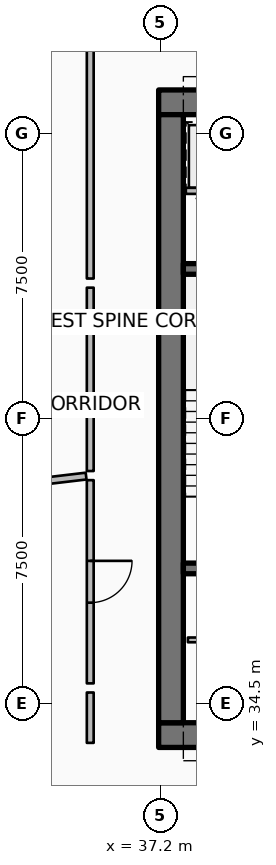
"""IFC4 building model, lengths in metres.
Left out: names, types, materials, properties, quantities, classifications, styles, units other than length and angle.
Written with IfcOpenShell. Run it as: python <this file> out.ifc"""

import sys

from ifc_helpers import new_model, si_unit, direction, frame, frame_2d, origin, place, context, subcontext, project, spatial, rectangle, extrude, element, fill, save


model = new_model("IFC4")
c1 = context("Model", 3, precision=1e-05, world=origin(), true_north=direction((0.0, 1.0)))
c2 = subcontext(c1, "Body", "Model", "MODEL_VIEW")
j1 = project(units=[si_unit("LENGTHUNIT", "METRE"), si_unit("PLANEANGLEUNIT", "RADIAN")], contexts=[c1])
p1 = place(None, origin())
s1 = spatial("IfcSite", under=j1, at=p1, CompositionType="ELEMENT")
p2 = place(p1, origin())
s2 = spatial("IfcBuilding", under=s1, at=p2, CompositionType="ELEMENT")
p3 = place(p2, frame((0.0, 0.0, 180.3)))
s3 = spatial("IfcBuildingStorey", under=s2, at=p3, CompositionType="ELEMENT", Elevation=180.3)
for number, where, z_axis, x_axis in (
    (1, (37.15, 33.675, 0.0), (0.0, 0.0, 1.0), (1.0, 0.0, 0.0)),
    (2, (37.15, 50.325, 0.0), (0.0, 0.0, 1.0), (1.0, 0.0, 0.0)),
):
    element("IfcWall", number, at=place(p3, frame(where, z_axis=z_axis, x_axis=x_axis)), inside=s3, PredefinedType="SHEAR", context=c2, shape_type="SweptSolid", body=[
        extrude(rectangle(XDim=9.75, YDim=0.65, at=frame_2d((4.875, 0.0))), origin(), (0.0, 0.0, 1.0), 3.75),
    ])
p4 = place(p3, frame((37.475, 34.0, 0.0), z_axis=(0.0, 0.0, 1.0), x_axis=(0.0, 1.0, 0.0)))
e3 = element("IfcWall", 3, at=p4, inside=s3, PredefinedType="SHEAR", context=c2, shape_type="SweptSolid", body=[
    extrude(rectangle(XDim=16.0, YDim=0.65, at=frame_2d((8.0, 0.0))), origin(), (0.0, 0.0, 1.0), 3.75),
])
for number, where, z_axis, x_axis in (
    (4, (37.8, 38.06, 0.0), (0.0, 0.0, 1.0), (1.0, 0.0, 0.0)),
    (5, (37.8, 45.94, 0.0), (0.0, 0.0, 1.0), (1.0, 0.0, 0.0)),
):
    element("IfcWall", number, at=place(p3, frame(where, z_axis=z_axis, x_axis=x_axis)), inside=s3, PredefinedType="SHEAR", context=c2, shape_type="SweptSolid", body=[
        extrude(rectangle(XDim=3.5, YDim=0.28, at=frame_2d((1.75, 0.0))), origin(), (0.0, 0.0, 1.0), 3.75),
    ])
p5 = place(p3, frame((39.975, 47.995, 0.0), z_axis=(0.0, 0.0, 1.0), x_axis=(-1.0, 0.0, 0.0)))
e6 = element("IfcWall", 6, at=p5, inside=s3, PredefinedType="PARTITIONING", context=c2, shape_type="SweptSolid", body=[
    extrude(rectangle(XDim=2.11, YDim=0.16, at=frame_2d((1.055, 0.0))), origin(), (0.0, 0.0, 1.0), 3.5),
])
p6 = place(p5, frame((0.505, 0.0, 0.0)))
e7 = element("IfcOpeningElement", 7, at=p6, cuts=e6, PredefinedType="OPENING", context=c2, shape_type="SweptSolid", body=[
    extrude(rectangle(XDim=1.1, YDim=2.1, at=frame_2d((0.55, 1.05))), frame((0.0, 0.09, 0.0), z_axis=(0.0, -1.0, 0.0), x_axis=(1.0, 0.0, 0.0)), (0.0, 0.0, 1.0), 0.18),
])
p7 = place(p3, frame((37.92, 36.18, 0.0), z_axis=(0.0, 0.0, 1.0), x_axis=(1.0, 0.0, 0.0)))
e8 = element("IfcWall", 8, at=p7, inside=s3, PredefinedType="PARTITIONING", context=c2, shape_type="SweptSolid", body=[
    extrude(rectangle(XDim=3.33, YDim=0.125, at=frame_2d((1.665, 0.0))), origin(), (0.0, 0.0, 1.0), 2.94),
])
p8 = place(p7, frame((1.24, 0.0, 0.0)))
e9 = element("IfcOpeningElement", 9, at=p8, cuts=e8, PredefinedType="OPENING", context=c2, shape_type="SweptSolid", body=[
    extrude(rectangle(XDim=0.85, YDim=2.06, at=frame_2d((0.425, 1.03))), frame((0.0, 0.073, 0.0), z_axis=(0.0, -1.0, 0.0), x_axis=(1.0, 0.0, 0.0)), (0.0, 0.0, 1.0), 0.145),
])
p9 = place(p3, frame((35.241, 40.49, 0.0), z_axis=(0.0, 0.0, 1.0), x_axis=(-0.993066731786, -0.117551972417, 0.0)))
e10 = element("IfcWall", 10, at=p9, inside=s3, PredefinedType="PARTITIONING", context=c2, shape_type="SweptSolid", body=[
    extrude(rectangle(XDim=15.047, YDim=0.18, at=frame_2d((7.523, 0.0))), origin(), (0.0, 0.0, 1.0), 2.94),
])
p10 = place(p3, frame((35.35, 51.853, 0.0), z_axis=(0.0, 0.0, 1.0), x_axis=(0.0, -1.0, 0.0)))
e11 = element("IfcWall", 11, at=p10, inside=s3, PredefinedType="PARTITIONING", context=c2, shape_type="SweptSolid", body=[
    extrude(rectangle(XDim=6.165, YDim=0.18, at=frame_2d((3.083, 0.0))), origin(), (0.0, 0.0, 1.0), 2.94),
])
p11 = place(p3, frame((35.35, 45.448, 0.0), z_axis=(0.0, 0.0, 1.0), x_axis=(0.0, -1.0, 0.0)))
e12 = element("IfcWall", 12, at=p11, inside=s3, PredefinedType="PARTITIONING", context=c2, shape_type="SweptSolid", body=[
    extrude(rectangle(XDim=4.825, YDim=0.18, at=frame_2d((2.413, 0.0))), origin(), (0.0, 0.0, 1.0), 2.94),
])
p12 = place(p3, frame((35.35, 40.383, 0.0), z_axis=(0.0, 0.0, 1.0), x_axis=(0.0, -1.0, 0.0)))
e13 = element("IfcWall", 13, at=p12, inside=s3, PredefinedType="PARTITIONING", context=c2, shape_type="SweptSolid", body=[
    extrude(rectangle(XDim=5.347, YDim=0.18, at=frame_2d((2.674, 0.0))), origin(), (0.0, 0.0, 1.0), 2.94),
])
p13 = place(p12, frame((2.124, 0.0, 0.0)))
e14 = element("IfcOpeningElement", 14, at=p13, cuts=e13, PredefinedType="OPENING", context=c2, shape_type="SweptSolid", body=[
    extrude(rectangle(XDim=1.1, YDim=2.1, at=frame_2d((0.55, 1.05))), frame((0.0, 0.1, 0.0), z_axis=(0.0, -1.0, 0.0), x_axis=(1.0, 0.0, 0.0)), (0.0, 0.0, 1.0), 0.2),
])
p14 = place(p3, frame((35.35, 34.796, 0.0), z_axis=(0.0, 0.0, 1.0), x_axis=(0.0, -1.0, 0.0)))
e15 = element("IfcWall", 15, at=p14, inside=s3, PredefinedType="PARTITIONING", context=c2, shape_type="SweptSolid", body=[
    extrude(rectangle(XDim=1.326, YDim=0.18, at=frame_2d((0.663, 0.0))), origin(), (0.0, 0.0, 1.0), 2.94),
])
p15 = place(p13, origin())
e16 = element("IfcDoor", 16, at=p15, inside=s3, OperationType="SINGLE_SWING_LEFT", PredefinedType="DOOR", context=c2, shape_type="SweptSolid", body=[
    extrude(rectangle(XDim=1.1, YDim=2.1, at=frame_2d((0.55, 1.05))), frame((0.0, 0.025, 0.0), z_axis=(0.0, -1.0, 0.0), x_axis=(1.0, 0.0, 0.0)), (0.0, 0.0, 1.0), 0.05),
])
fill(e14, e16)
save(model, sys.argv[1])
